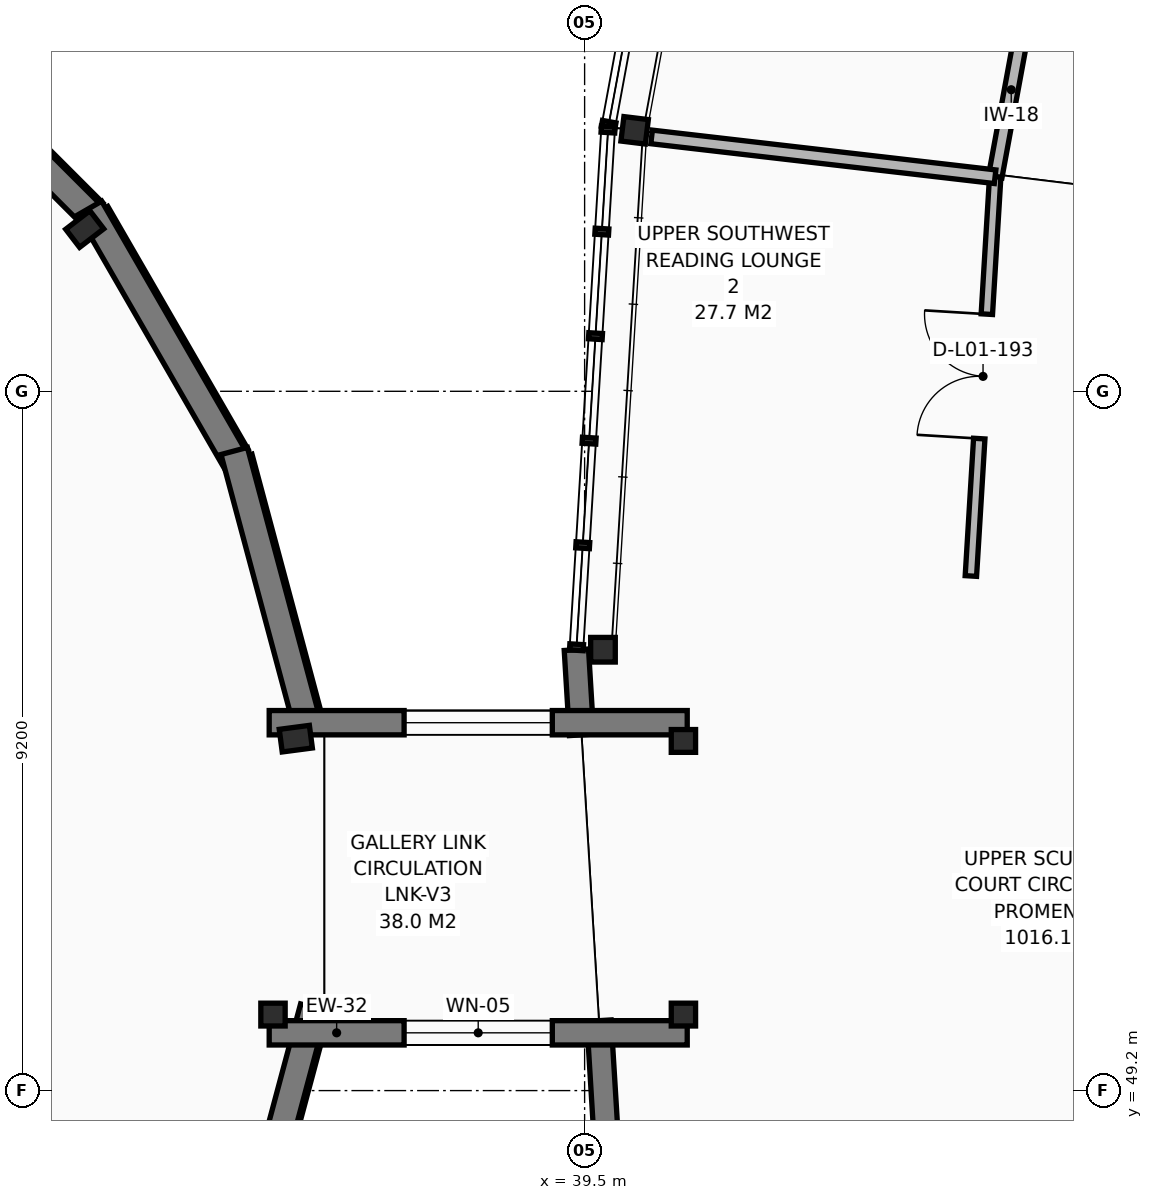
"""IFC4 building model, lengths in metres.
Left out: names, types, materials, properties, quantities, classifications, styles, units other than length and angle.
Written with IfcOpenShell. Run it as: python <this file> out.ifc"""

import sys

from ifc_helpers import new_model, si_unit, direction, frame, frame_2d, origin, origin_2d, place, context, subcontext, project, spatial, rectangle, hollow_circle, i_section, extrude, element, fill, save


model = new_model("IFC4")
c1 = context("Model", 3, precision=1e-05, world=origin(), true_north=direction((0.0, 1.0)))
c2 = subcontext(c1, "Body", "Model", "MODEL_VIEW")
j1 = project(units=[si_unit("LENGTHUNIT", "METRE"), si_unit("PLANEANGLEUNIT", "RADIAN")], contexts=[c1])
p1 = place(None, origin())
s1 = spatial("IfcSite", under=j1, at=p1, CompositionType="ELEMENT")
p2 = place(p1, origin())
s2 = spatial("IfcBuilding", under=s1, at=p2, CompositionType="ELEMENT")
p3 = place(p2, frame((0.0, 0.0, 5.1)))
s3 = spatial("IfcBuildingStorey", under=s2, at=p3, CompositionType="ELEMENT", Elevation=5.1)
for number, where, z_axis, x_axis in (
    (1, (40.158, 61.833, 0.0), (0.0, 0.0, 1.0), (0.993, -0.122, 0.0)),
    (2, (39.741, 55.0, 0.0), (0.0, 0.0, 1.0), (1.0, 0.0, 0.0)),
):
    element("IfcColumn", number, at=place(p3, frame(where, z_axis=z_axis, x_axis=x_axis)), inside=s3, PredefinedType="COLUMN", context=c2, shape_type="SweptSolid", body=[
        extrude(hollow_circle(Radius=0.162, WallThickness=0.016, at=origin_2d()), origin(), (0.0, 0.0, 1.0), 4.42),
    ])
for number, where, z_axis, x_axis in (
    (3, (35.7, 53.83, 0.0), (0.0, 0.0, 1.0), (0.991, 0.131, 0.0)),
    (4, (32.923, 60.535, 0.0), (0.0, 0.0, 1.0), (0.793, 0.609, 0.0)),
):
    element("IfcColumn", number, at=place(p3, frame(where, z_axis=z_axis, x_axis=x_axis)), inside=s3, PredefinedType="COLUMN", context=c2, shape_type="SweptSolid", body=[
        extrude(i_section(OverallWidth=0.3, OverallDepth=0.4, WebThickness=0.013, FlangeThickness=0.024, FilletRadius=0.027, at=origin_2d()), origin(), (0.0, 0.0, 1.0), 4.42),
    ])
for number, where, z_axis, x_axis in (
    (5, (35.4, 50.2, 0.0), (0.0, 0.0, 1.0), (1.0, 0.0, 0.0)),
    (6, (40.8, 50.2, 0.0), (0.0, 0.0, 1.0), (1.0, 0.0, 0.0)),
    (7, (40.8, 53.8, 0.0), (0.0, 0.0, 1.0), (1.0, 0.0, 0.0)),
):
    element("IfcColumn", number, at=place(p3, frame(where, z_axis=z_axis, x_axis=x_axis)), inside=s3, PredefinedType="COLUMN", context=c2, shape_type="SweptSolid", body=[
        extrude(i_section(OverallWidth=0.3, OverallDepth=0.32, WebThickness=0.011, FlangeThickness=0.021, FilletRadius=0.027, at=origin_2d()), origin(), (0.0, 0.0, 1.0), 4.42),
    ])
p4 = place(p3, frame((39.46, 53.88, 0.0), z_axis=(0.0, 0.0, 1.0), x_axis=(-0.060698683883, 0.998156134968, 0.0)))
e8 = element("IfcWall", 8, at=p4, inside=s3, PredefinedType="SOLIDWALL", context=c2, shape_type="SweptSolid", body=[
    extrude(rectangle(XDim=1.122, YDim=0.32, at=frame_2d((0.561, 0.0))), origin(), (0.0, 0.0, 1.0), 4.18),
])
p5 = place(p3, frame((39.811, 48.124, 0.0), z_axis=(0.0, 0.0, 1.0), x_axis=(-0.060797305058, 0.998150132845, 0.0)))
e9 = element("IfcWall", 9, at=p5, inside=s3, PredefinedType="SOLIDWALL", context=c2, shape_type="SweptSolid", body=[
    extrude(rectangle(XDim=2.0, YDim=0.32, at=frame_2d((1.0, 0.0))), origin(), (0.0, 0.0, 1.0), 4.18),
])
p6 = place(p3, frame((35.937, 50.294, 0.0), z_axis=(0.0, 0.0, 1.0), x_axis=(-0.258798150836, -0.965931424649, 0.0)))
e10 = element("IfcWall", 10, at=p6, inside=s3, PredefinedType="SOLIDWALL", context=c2, shape_type="SweptSolid", body=[
    extrude(rectangle(XDim=3.867, YDim=0.36, at=frame_2d((1.934, 0.0))), origin(), (0.0, 0.0, 1.0), 4.17),
])
for number, where, z_axis, x_axis in (
    (11, (30.328, 63.408, 0.0), (0.0, 0.0, 1.0), (0.707, -0.707, 0.0)),
    (12, (32.99, 60.812, 0.0), (0.0, 0.0, 1.0), (0.5, -0.866, 0.0)),
):
    element("IfcWall", number, at=place(p3, frame(where, z_axis=z_axis, x_axis=x_axis)), inside=s3, PredefinedType="SOLIDWALL", context=c2, shape_type="SweptSolid", body=[
        extrude(rectangle(XDim=3.892, YDim=0.36, at=frame_2d((1.946, 0.0))), origin(), (0.0, 0.0, 1.0), 4.17),
    ])
p7 = place(p3, frame((34.89, 57.615, 0.0), z_axis=(0.0, 0.0, 1.0), x_axis=(0.258798150836, -0.965931424649, 0.0)))
e13 = element("IfcWall", 13, at=p7, inside=s3, PredefinedType="SOLIDWALL", context=c2, shape_type="SweptSolid", body=[
    extrude(rectangle(XDim=3.867, YDim=0.36, at=frame_2d((1.934, 0.0))), origin(), (0.0, 0.0, 1.0), 4.17),
])
p8 = place(p3, frame((40.85, 49.96, 0.0), z_axis=(0.0, 0.0, 1.0), x_axis=(-1.0, 0.0, 0.0)))
e14 = element("IfcWall", 14, at=p8, inside=s3, PredefinedType="SOLIDWALL", context=c2, shape_type="SweptSolid", body=[
    extrude(rectangle(XDim=5.5, YDim=0.32, at=frame_2d((2.75, 0.0))), origin(), (0.0, 0.0, 1.0), 4.17),
])
p9 = place(p8, frame((1.775, 0.0, 1.12)))
e15 = element("IfcOpeningElement", 15, at=p9, cuts=e14, PredefinedType="OPENING", context=c2, shape_type="SweptSolid", body=[
    extrude(rectangle(XDim=1.95, YDim=1.5, at=frame_2d((0.975, 0.75))), frame((0.0, 0.17, 0.0), z_axis=(0.0, -1.0, 0.0), x_axis=(1.0, 0.0, 0.0)), (0.0, 0.0, 1.0), 0.34),
])
p10 = place(p3, frame((35.35, 54.04, 0.0), z_axis=(0.0, 0.0, 1.0), x_axis=(1.0, 0.0, 0.0)))
e16 = element("IfcWall", 16, at=p10, inside=s3, PredefinedType="SOLIDWALL", context=c2, shape_type="SweptSolid", body=[
    extrude(rectangle(XDim=5.5, YDim=0.32, at=frame_2d((2.75, 0.0))), origin(), (0.0, 0.0, 1.0), 4.17),
])
p11 = place(p10, frame((1.775, 0.0, 1.12)))
e17 = element("IfcOpeningElement", 17, at=p11, cuts=e16, PredefinedType="OPENING", context=c2, shape_type="SweptSolid", body=[
    extrude(rectangle(XDim=1.95, YDim=1.5, at=frame_2d((0.975, 0.75))), frame((0.0, 0.17, 0.0), z_axis=(0.0, -1.0, 0.0), x_axis=(1.0, 0.0, 0.0)), (0.0, 0.0, 1.0), 0.34),
])
p12 = place(p3, frame((44.902, 61.223, 0.0), z_axis=(0.0, 0.0, 1.0), x_axis=(0.181126899018, 0.98345973301, 0.0)))
e18 = element("IfcWall", 18, at=p12, inside=s3, PredefinedType="PARTITIONING", context=c2, shape_type="SweptSolid", body=[
    extrude(rectangle(XDim=6.296, YDim=0.18, at=frame_2d((3.148, 0.0))), origin(), (0.0, 0.0, 1.0), 3.57),
])
p13 = place(p12, frame((2.328, 0.0, 0.0)))
e19 = element("IfcOpeningElement", 19, at=p13, cuts=e18, PredefinedType="OPENING", context=c2, shape_type="SweptSolid", body=[
    extrude(rectangle(XDim=1.64, YDim=2.2, at=frame_2d((0.82, 1.1))), frame((0.0, 0.1, 0.0), z_axis=(0.0, -1.0, 0.0), x_axis=(1.0, 0.0, 0.0)), (0.0, 0.0, 1.0), 0.2),
])
p14 = place(p3, frame((44.582, 55.97, 0.0), z_axis=(0.0, 0.0, 1.0), x_axis=(0.060821422168, 0.998148663579, 0.0)))
e20 = element("IfcWall", 20, at=p14, inside=s3, PredefinedType="PARTITIONING", context=c2, shape_type="SweptSolid", body=[
    extrude(rectangle(XDim=5.262, YDim=0.15, at=frame_2d((2.631, 0.0))), origin(), (0.0, 0.0, 1.0), 3.57),
])
p15 = place(p14, frame((1.811, 0.0, 0.0)))
e21 = element("IfcOpeningElement", 21, at=p15, cuts=e20, PredefinedType="OPENING", context=c2, shape_type="SweptSolid", body=[
    extrude(rectangle(XDim=1.64, YDim=2.2, at=frame_2d((0.82, 1.1))), frame((0.0, 0.085, 0.0), z_axis=(0.0, -1.0, 0.0), x_axis=(1.0, 0.0, 0.0)), (0.0, 0.0, 1.0), 0.17),
])
p16 = place(p3, frame((44.901, 61.223, 0.0), z_axis=(0.0, 0.0, 1.0), x_axis=(-0.993352407823, 0.11511296136, 0.0)))
e22 = element("IfcWall", 22, at=p16, inside=s3, PredefinedType="PARTITIONING", context=c2, shape_type="SweptSolid", body=[
    extrude(rectangle(XDim=4.549, YDim=0.18, at=frame_2d((2.275, 0.0))), origin(), (0.0, 0.0, 1.0), 3.57),
])
p17 = place(p9, origin())
e23 = element("IfcWindow", 23, at=p17, inside=s3, PartitioningType="SINGLE_PANEL", PredefinedType="WINDOW", context=c2, shape_type="SweptSolid", body=[
    extrude(rectangle(XDim=1.95, YDim=1.5, at=frame_2d((0.975, 0.75))), frame((0.0, 0.03, 0.0), z_axis=(0.0, -1.0, 0.0), x_axis=(1.0, 0.0, 0.0)), (0.0, 0.0, 1.0), 0.06),
])
fill(e15, e23)
p18 = place(p11, origin())
e24 = element("IfcWindow", 24, at=p18, inside=s3, PartitioningType="SINGLE_PANEL", PredefinedType="WINDOW", context=c2, shape_type="SweptSolid", body=[
    extrude(rectangle(XDim=1.95, YDim=1.5, at=frame_2d((0.975, 0.75))), frame((0.0, 0.03, 0.0), z_axis=(0.0, -1.0, 0.0), x_axis=(1.0, 0.0, 0.0)), (0.0, 0.0, 1.0), 0.06),
])
fill(e17, e24)
p19 = place(p15, origin())
e25 = element("IfcDoor", 25, at=p19, inside=s3, OperationType="DOUBLE_DOOR_SINGLE_SWING", PredefinedType="DOOR", context=c2, shape_type="SweptSolid", body=[
    extrude(rectangle(XDim=1.64, YDim=2.2, at=frame_2d((0.82, 1.1))), frame((0.0, 0.025, 0.0), z_axis=(0.0, -1.0, 0.0), x_axis=(1.0, 0.0, 0.0)), (0.0, 0.0, 1.0), 0.05),
])
fill(e21, e25)
save(model, sys.argv[1])
